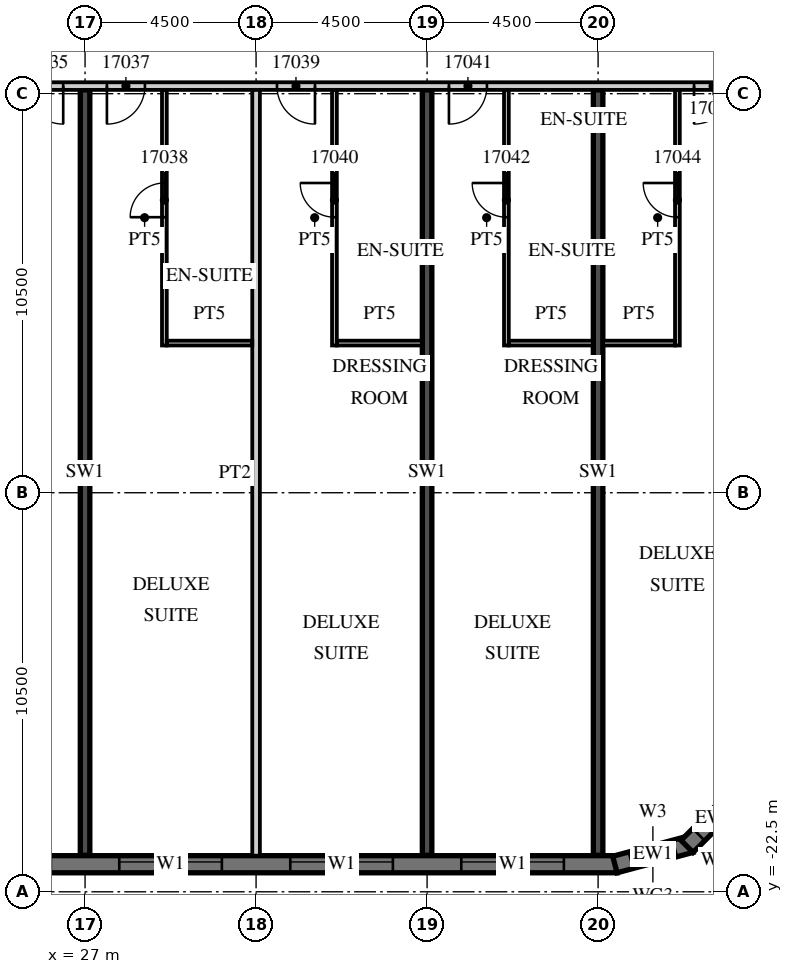
"""IFC4 building model, lengths in metres.
Left out: names, types, materials, properties, quantities, classifications, styles, units other than length and angle.
Written with IfcOpenShell. Run it as: python <this file> out.ifc"""

import sys

from ifc_helpers import new_model, si_unit, direction, frame, frame_2d, origin, place, context, subcontext, project, spatial, polyline, rectangle, outline, extrude, element, fill, save


model = new_model("IFC4")
c1 = context("Model", 3, precision=1e-05, world=origin(), true_north=direction((0.0, 1.0)))
c2 = subcontext(c1, "Body", "Model", "MODEL_VIEW")
j1 = project(units=[si_unit("LENGTHUNIT", "METRE"), si_unit("PLANEANGLEUNIT", "RADIAN")], contexts=[c1])
p1 = place(None, origin())
s1 = spatial("IfcSite", under=j1, at=p1, CompositionType="ELEMENT")
p2 = place(p1, origin())
s2 = spatial("IfcBuilding", under=s1, at=p2, CompositionType="ELEMENT")
p3 = place(p2, frame((0.0, 0.0, 86.4)))
s3 = spatial("IfcBuildingStorey", under=s2, at=p3, CompositionType="ELEMENT", Elevation=86.4)
for number, where, z_axis, x_axis in (
    (1, (27.0, -21.54, 0.0), (0.0, 0.0, 1.0), (0.0, 1.0, 0.0)),
    (2, (36.0, -21.54, 0.0), (0.0, 0.0, 1.0), (0.0, 1.0, 0.0)),
    (3, (40.5, -21.54, 0.0), (0.0, 0.0, 1.0), (0.0, 1.0, 0.0)),
):
    element("IfcWall", number, at=place(p3, frame(where, z_axis=z_axis, x_axis=x_axis)), inside=s3, PredefinedType="SHEAR", context=c2, shape_type="SweptSolid", body=[
        extrude(rectangle(XDim=20.14, YDim=0.25, at=frame_2d((10.07, 0.0))), origin(), (0.0, 0.0, 1.0), 3.3),
    ])
p4 = place(p3, frame((-13.5, -21.775, 0.0), z_axis=(0.0, 0.0, 1.0), x_axis=(1.0, 0.0, 0.0)))
e4 = element("IfcWall", 4, at=p4, inside=s3, PredefinedType="SOLIDWALL", context=c2, shape_type="SweptSolid", body=[
    extrude(rectangle(XDim=54.5, YDim=0.45, at=frame_2d((27.25, 0.0))), origin(), (0.0, 0.0, 1.0), 3.02),
])
p5 = place(p4, frame((0.9, 0.0, 0.45)))
e5 = element("IfcOpeningElement", 5, at=p5, cuts=e4, PredefinedType="OPENING", context=c2, shape_type="SweptSolid", body=[
    extrude(rectangle(XDim=2.7, YDim=2.25, at=frame_2d((1.35, 1.125))), frame((0.0, 0.235, 0.0), z_axis=(0.0, -1.0, 0.0), x_axis=(1.0, 0.0, 0.0)), (0.0, 0.0, 1.0), 0.47),
])
p6 = place(p4, frame((5.4, 0.0, 0.45)))
e6 = element("IfcOpeningElement", 6, at=p6, cuts=e4, PredefinedType="OPENING", context=c2, shape_type="SweptSolid", body=[
    extrude(rectangle(XDim=2.7, YDim=2.25, at=frame_2d((1.35, 1.125))), frame((0.0, 0.235, 0.0), z_axis=(0.0, -1.0, 0.0), x_axis=(1.0, 0.0, 0.0)), (0.0, 0.0, 1.0), 0.47),
])
p7 = place(p4, frame((9.9, 0.0, 0.45)))
e7 = element("IfcOpeningElement", 7, at=p7, cuts=e4, PredefinedType="OPENING", context=c2, shape_type="SweptSolid", body=[
    extrude(rectangle(XDim=2.7, YDim=2.25, at=frame_2d((1.35, 1.125))), frame((0.0, 0.235, 0.0), z_axis=(0.0, -1.0, 0.0), x_axis=(1.0, 0.0, 0.0)), (0.0, 0.0, 1.0), 0.47),
])
p8 = place(p4, frame((14.4, 0.0, 0.45)))
e8 = element("IfcOpeningElement", 8, at=p8, cuts=e4, PredefinedType="OPENING", context=c2, shape_type="SweptSolid", body=[
    extrude(rectangle(XDim=2.7, YDim=2.25, at=frame_2d((1.35, 1.125))), frame((0.0, 0.235, 0.0), z_axis=(0.0, -1.0, 0.0), x_axis=(1.0, 0.0, 0.0)), (0.0, 0.0, 1.0), 0.47),
])
p9 = place(p4, frame((18.9, 0.0, 0.45)))
e9 = element("IfcOpeningElement", 9, at=p9, cuts=e4, PredefinedType="OPENING", context=c2, shape_type="SweptSolid", body=[
    extrude(rectangle(XDim=2.7, YDim=2.25, at=frame_2d((1.35, 1.125))), frame((0.0, 0.235, 0.0), z_axis=(0.0, -1.0, 0.0), x_axis=(1.0, 0.0, 0.0)), (0.0, 0.0, 1.0), 0.47),
])
p10 = place(p4, frame((23.4, 0.0, 0.45)))
e10 = element("IfcOpeningElement", 10, at=p10, cuts=e4, PredefinedType="OPENING", context=c2, shape_type="SweptSolid", body=[
    extrude(rectangle(XDim=2.7, YDim=2.25, at=frame_2d((1.35, 1.125))), frame((0.0, 0.235, 0.0), z_axis=(0.0, -1.0, 0.0), x_axis=(1.0, 0.0, 0.0)), (0.0, 0.0, 1.0), 0.47),
])
p11 = place(p4, frame((27.9, 0.0, 0.45)))
e11 = element("IfcOpeningElement", 11, at=p11, cuts=e4, PredefinedType="OPENING", context=c2, shape_type="SweptSolid", body=[
    extrude(rectangle(XDim=2.7, YDim=2.25, at=frame_2d((1.35, 1.125))), frame((0.0, 0.235, 0.0), z_axis=(0.0, -1.0, 0.0), x_axis=(1.0, 0.0, 0.0)), (0.0, 0.0, 1.0), 0.47),
])
p12 = place(p4, frame((32.4, 0.0, 0.45)))
e12 = element("IfcOpeningElement", 12, at=p12, cuts=e4, PredefinedType="OPENING", context=c2, shape_type="SweptSolid", body=[
    extrude(rectangle(XDim=2.7, YDim=2.25, at=frame_2d((1.35, 1.125))), frame((0.0, 0.235, 0.0), z_axis=(0.0, -1.0, 0.0), x_axis=(1.0, 0.0, 0.0)), (0.0, 0.0, 1.0), 0.47),
])
p13 = place(p4, frame((36.9, 0.0, 0.45)))
e13 = element("IfcOpeningElement", 13, at=p13, cuts=e4, PredefinedType="OPENING", context=c2, shape_type="SweptSolid", body=[
    extrude(rectangle(XDim=2.7, YDim=2.25, at=frame_2d((1.35, 1.125))), frame((0.0, 0.235, 0.0), z_axis=(0.0, -1.0, 0.0), x_axis=(1.0, 0.0, 0.0)), (0.0, 0.0, 1.0), 0.47),
])
p14 = place(p4, frame((41.4, 0.0, 0.45)))
e14 = element("IfcOpeningElement", 14, at=p14, cuts=e4, PredefinedType="OPENING", context=c2, shape_type="SweptSolid", body=[
    extrude(rectangle(XDim=2.7, YDim=2.25, at=frame_2d((1.35, 1.125))), frame((0.0, 0.235, 0.0), z_axis=(0.0, -1.0, 0.0), x_axis=(1.0, 0.0, 0.0)), (0.0, 0.0, 1.0), 0.47),
])
p15 = place(p4, frame((45.9, 0.0, 0.45)))
e15 = element("IfcOpeningElement", 15, at=p15, cuts=e4, PredefinedType="OPENING", context=c2, shape_type="SweptSolid", body=[
    extrude(rectangle(XDim=2.7, YDim=2.25, at=frame_2d((1.35, 1.125))), frame((0.0, 0.235, 0.0), z_axis=(0.0, -1.0, 0.0), x_axis=(1.0, 0.0, 0.0)), (0.0, 0.0, 1.0), 0.47),
])
p16 = place(p4, frame((50.4, 0.0, 0.45)))
e16 = element("IfcOpeningElement", 16, at=p16, cuts=e4, PredefinedType="OPENING", context=c2, shape_type="SweptSolid", body=[
    extrude(rectangle(XDim=2.7, YDim=2.25, at=frame_2d((1.35, 1.125))), frame((0.0, 0.235, 0.0), z_axis=(0.0, -1.0, 0.0), x_axis=(1.0, 0.0, 0.0)), (0.0, 0.0, 1.0), 0.47),
])
p17 = place(p3, frame((40.942, -21.783, 0.0), z_axis=(0.0, 0.0, 1.0), x_axis=(0.965926999034, 0.25881466832, 0.0)))
e17 = element("IfcWall", 17, at=p17, inside=s3, PredefinedType="SOLIDWALL", context=c2, shape_type="SweptSolid", body=[
    extrude(outline(polyline([(0.0, -0.225), (2.071, -0.225), (1.95, 0.225), (0.121, 0.225), (0.0, -0.225)])), origin(), (0.0, 0.0, 1.0), 3.02),
])
p18 = place(p17, frame((0.435, 0.0, 0.45)))
e18 = element("IfcOpeningElement", 18, at=p18, cuts=e17, PredefinedType="OPENING", context=c2, shape_type="SweptSolid", body=[
    extrude(rectangle(XDim=1.2, YDim=2.25, at=frame_2d((0.6, 1.125))), frame((0.0, 0.235, 0.0), z_axis=(0.0, -1.0, 0.0), x_axis=(1.0, 0.0, 0.0)), (0.0, 0.0, 1.0), 0.47),
])
p19 = place(p3, frame((42.841, -21.305, 0.0), z_axis=(0.0, 0.0, 1.0), x_axis=(0.707106781187, 0.707106781187, 0.0)))
e19 = element("IfcWall", 19, at=p19, inside=s3, PredefinedType="SOLIDWALL", context=c2, shape_type="SweptSolid", body=[
    extrude(outline(polyline([(0.0, -0.225), (2.071, -0.225), (1.95, 0.225), (0.121, 0.225), (0.0, -0.225)])), origin(), (0.0, 0.0, 1.0), 3.02),
])
p20 = place(p19, frame((0.435, 0.0, 0.45)))
e20 = element("IfcOpeningElement", 20, at=p20, cuts=e19, PredefinedType="OPENING", context=c2, shape_type="SweptSolid", body=[
    extrude(rectangle(XDim=1.2, YDim=2.25, at=frame_2d((0.6, 1.125))), frame((0.0, 0.235, 0.0), z_axis=(0.0, -1.0, 0.0), x_axis=(1.0, 0.0, 0.0)), (0.0, 0.0, 1.0), 0.47),
])
p21 = place(p3, frame((-13.5, -1.3, 0.0), z_axis=(0.0, 0.0, 1.0), x_axis=(1.0, 0.0, 0.0)))
e21 = element("IfcWall", 21, at=p21, inside=s3, PredefinedType="PARTITIONING", context=c2, shape_type="SweptSolid", body=[
    extrude(rectangle(XDim=58.05, YDim=0.2, at=frame_2d((29.025, 0.0))), origin(), (0.0, 0.0, 1.0), 3.02),
])
p22 = place(p21, frame((2.925, 0.0, 0.0)))
e22 = element("IfcOpeningElement", 22, at=p22, cuts=e21, PredefinedType="OPENING", context=c2, shape_type="SweptSolid", body=[
    extrude(rectangle(XDim=1.0, YDim=2.1, at=frame_2d((0.5, 1.05))), frame((0.0, 0.11, 0.0), z_axis=(0.0, -1.0, 0.0), x_axis=(1.0, 0.0, 0.0)), (0.0, 0.0, 1.0), 0.22),
])
p23 = place(p21, frame((5.075, 0.0, 0.0)))
e23 = element("IfcOpeningElement", 23, at=p23, cuts=e21, PredefinedType="OPENING", context=c2, shape_type="SweptSolid", body=[
    extrude(rectangle(XDim=1.0, YDim=2.1, at=frame_2d((0.5, 1.05))), frame((0.0, 0.11, 0.0), z_axis=(0.0, -1.0, 0.0), x_axis=(1.0, 0.0, 0.0)), (0.0, 0.0, 1.0), 0.22),
])
p24 = place(p21, frame((9.55, 0.0, 0.0)))
e24 = element("IfcOpeningElement", 24, at=p24, cuts=e21, PredefinedType="OPENING", context=c2, shape_type="SweptSolid", body=[
    extrude(rectangle(XDim=1.0, YDim=2.1, at=frame_2d((0.5, 1.05))), frame((0.0, 0.11, 0.0), z_axis=(0.0, -1.0, 0.0), x_axis=(1.0, 0.0, 0.0)), (0.0, 0.0, 1.0), 0.22),
])
p25 = place(p21, frame((14.075, 0.0, 0.0)))
e25 = element("IfcOpeningElement", 25, at=p25, cuts=e21, PredefinedType="OPENING", context=c2, shape_type="SweptSolid", body=[
    extrude(rectangle(XDim=1.0, YDim=2.1, at=frame_2d((0.5, 1.05))), frame((0.0, 0.11, 0.0), z_axis=(0.0, -1.0, 0.0), x_axis=(1.0, 0.0, 0.0)), (0.0, 0.0, 1.0), 0.22),
])
p26 = place(p21, frame((20.925, 0.0, 0.0)))
e26 = element("IfcOpeningElement", 26, at=p26, cuts=e21, PredefinedType="OPENING", context=c2, shape_type="SweptSolid", body=[
    extrude(rectangle(XDim=1.0, YDim=2.1, at=frame_2d((0.5, 1.05))), frame((0.0, 0.11, 0.0), z_axis=(0.0, -1.0, 0.0), x_axis=(1.0, 0.0, 0.0)), (0.0, 0.0, 1.0), 0.22),
])
p27 = place(p21, frame((27.862, 0.0, 0.0)))
e27 = element("IfcOpeningElement", 27, at=p27, cuts=e21, PredefinedType="OPENING", context=c2, shape_type="SweptSolid", body=[
    extrude(rectangle(XDim=1.2, YDim=2.1, at=frame_2d((0.6, 1.05))), frame((0.0, 0.11, 0.0), z_axis=(0.0, -1.0, 0.0), x_axis=(1.0, 0.0, 0.0)), (0.0, 0.0, 1.0), 0.22),
])
p28 = place(p21, frame((34.45, 0.0, 0.0)))
e28 = element("IfcOpeningElement", 28, at=p28, cuts=e21, PredefinedType="OPENING", context=c2, shape_type="SweptSolid", body=[
    extrude(rectangle(XDim=1.0, YDim=2.1, at=frame_2d((0.5, 1.05))), frame((0.0, 0.11, 0.0), z_axis=(0.0, -1.0, 0.0), x_axis=(1.0, 0.0, 0.0)), (0.0, 0.0, 1.0), 0.22),
])
p29 = place(p21, frame((38.925, 0.0, 0.0)))
e29 = element("IfcOpeningElement", 29, at=p29, cuts=e21, PredefinedType="OPENING", context=c2, shape_type="SweptSolid", body=[
    extrude(rectangle(XDim=1.0, YDim=2.1, at=frame_2d((0.5, 1.05))), frame((0.0, 0.11, 0.0), z_axis=(0.0, -1.0, 0.0), x_axis=(1.0, 0.0, 0.0)), (0.0, 0.0, 1.0), 0.22),
])
p30 = place(p21, frame((41.075, 0.0, 0.0)))
e30 = element("IfcOpeningElement", 30, at=p30, cuts=e21, PredefinedType="OPENING", context=c2, shape_type="SweptSolid", body=[
    extrude(rectangle(XDim=1.0, YDim=2.1, at=frame_2d((0.5, 1.05))), frame((0.0, 0.11, 0.0), z_axis=(0.0, -1.0, 0.0), x_axis=(1.0, 0.0, 0.0)), (0.0, 0.0, 1.0), 0.22),
])
p31 = place(p21, frame((45.55, 0.0, 0.0)))
e31 = element("IfcOpeningElement", 31, at=p31, cuts=e21, PredefinedType="OPENING", context=c2, shape_type="SweptSolid", body=[
    extrude(rectangle(XDim=1.0, YDim=2.1, at=frame_2d((0.5, 1.05))), frame((0.0, 0.11, 0.0), z_axis=(0.0, -1.0, 0.0), x_axis=(1.0, 0.0, 0.0)), (0.0, 0.0, 1.0), 0.22),
])
p32 = place(p21, frame((50.075, 0.0, 0.0)))
e32 = element("IfcOpeningElement", 32, at=p32, cuts=e21, PredefinedType="OPENING", context=c2, shape_type="SweptSolid", body=[
    extrude(rectangle(XDim=1.0, YDim=2.1, at=frame_2d((0.5, 1.05))), frame((0.0, 0.11, 0.0), z_axis=(0.0, -1.0, 0.0), x_axis=(1.0, 0.0, 0.0)), (0.0, 0.0, 1.0), 0.22),
])
p33 = place(p21, frame((56.525, 0.0, 0.0)))
e33 = element("IfcOpeningElement", 33, at=p33, cuts=e21, PredefinedType="OPENING", context=c2, shape_type="SweptSolid", body=[
    extrude(rectangle(XDim=1.0, YDim=2.1, at=frame_2d((0.5, 1.05))), frame((0.0, 0.11, 0.0), z_axis=(0.0, -1.0, 0.0), x_axis=(1.0, 0.0, 0.0)), (0.0, 0.0, 1.0), 0.22),
])
p34 = place(p3, frame((31.5, -21.55, 0.0), z_axis=(0.0, 0.0, 1.0), x_axis=(0.0, 1.0, 0.0)))
e34 = element("IfcWall", 34, at=p34, inside=s3, PredefinedType="PARTITIONING", context=c2, shape_type="SweptSolid", body=[
    extrude(rectangle(XDim=20.15, YDim=0.2, at=frame_2d((10.075, 0.0))), origin(), (0.0, 0.0, 1.0), 3.02),
])
p35 = place(p3, frame((29.087, -8.125, 0.0), z_axis=(0.0, 0.0, 1.0), x_axis=(0.0, 1.0, 0.0)))
e35 = element("IfcWall", 35, at=p35, inside=s3, PredefinedType="PARTITIONING", context=c2, shape_type="SweptSolid", body=[
    extrude(rectangle(XDim=6.725, YDim=0.125, at=frame_2d((3.363, 0.0))), origin(), (0.0, 0.0, 1.0), 3.02),
])
p36 = place(p35, frame((3.375, 0.0, 0.0)))
e36 = element("IfcOpeningElement", 36, at=p36, cuts=e35, PredefinedType="OPENING", context=c2, shape_type="SweptSolid", body=[
    extrude(rectangle(XDim=0.9, YDim=2.1, at=frame_2d((0.45, 1.05))), frame((0.0, 0.073, 0.0), z_axis=(0.0, -1.0, 0.0), x_axis=(1.0, 0.0, 0.0)), (0.0, 0.0, 1.0), 0.145),
])
p37 = place(p3, frame((29.15, -8.062, 0.0), z_axis=(0.0, 0.0, 1.0), x_axis=(1.0, 0.0, 0.0)))
e37 = element("IfcWall", 37, at=p37, inside=s3, PredefinedType="PARTITIONING", context=c2, shape_type="SweptSolid", body=[
    extrude(rectangle(XDim=2.25, YDim=0.125, at=frame_2d((1.125, 0.0))), origin(), (0.0, 0.0, 1.0), 3.02),
])
p38 = place(p3, frame((33.562, -8.125, 0.0), z_axis=(0.0, 0.0, 1.0), x_axis=(0.0, 1.0, 0.0)))
e38 = element("IfcWall", 38, at=p38, inside=s3, PredefinedType="PARTITIONING", context=c2, shape_type="SweptSolid", body=[
    extrude(rectangle(XDim=6.725, YDim=0.125, at=frame_2d((3.363, 0.0))), origin(), (0.0, 0.0, 1.0), 3.02),
])
p39 = place(p38, frame((3.375, 0.0, 0.0)))
e39 = element("IfcOpeningElement", 39, at=p39, cuts=e38, PredefinedType="OPENING", context=c2, shape_type="SweptSolid", body=[
    extrude(rectangle(XDim=0.9, YDim=2.1, at=frame_2d((0.45, 1.05))), frame((0.0, 0.073, 0.0), z_axis=(0.0, -1.0, 0.0), x_axis=(1.0, 0.0, 0.0)), (0.0, 0.0, 1.0), 0.145),
])
p40 = place(p3, frame((33.625, -8.062, 0.0), z_axis=(0.0, 0.0, 1.0), x_axis=(1.0, 0.0, 0.0)))
e40 = element("IfcWall", 40, at=p40, inside=s3, PredefinedType="PARTITIONING", context=c2, shape_type="SweptSolid", body=[
    extrude(rectangle(XDim=2.25, YDim=0.125, at=frame_2d((1.125, 0.0))), origin(), (0.0, 0.0, 1.0), 3.02),
])
p41 = place(p3, frame((38.087, -8.125, 0.0), z_axis=(0.0, 0.0, 1.0), x_axis=(0.0, 1.0, 0.0)))
e41 = element("IfcWall", 41, at=p41, inside=s3, PredefinedType="PARTITIONING", context=c2, shape_type="SweptSolid", body=[
    extrude(rectangle(XDim=6.725, YDim=0.125, at=frame_2d((3.363, 0.0))), origin(), (0.0, 0.0, 1.0), 3.02),
])
p42 = place(p41, frame((3.375, 0.0, 0.0)))
e42 = element("IfcOpeningElement", 42, at=p42, cuts=e41, PredefinedType="OPENING", context=c2, shape_type="SweptSolid", body=[
    extrude(rectangle(XDim=0.9, YDim=2.1, at=frame_2d((0.45, 1.05))), frame((0.0, 0.073, 0.0), z_axis=(0.0, -1.0, 0.0), x_axis=(1.0, 0.0, 0.0)), (0.0, 0.0, 1.0), 0.145),
])
p43 = place(p3, frame((38.15, -8.062, 0.0), z_axis=(0.0, 0.0, 1.0), x_axis=(1.0, 0.0, 0.0)))
e43 = element("IfcWall", 43, at=p43, inside=s3, PredefinedType="PARTITIONING", context=c2, shape_type="SweptSolid", body=[
    extrude(rectangle(XDim=2.225, YDim=0.125, at=frame_2d((1.113, 0.0))), origin(), (0.0, 0.0, 1.0), 3.02),
])
p44 = place(p3, frame((42.587, -8.125, 0.0), z_axis=(0.0, 0.0, 1.0), x_axis=(0.0, 1.0, 0.0)))
e44 = element("IfcWall", 44, at=p44, inside=s3, PredefinedType="PARTITIONING", context=c2, shape_type="SweptSolid", body=[
    extrude(rectangle(XDim=6.725, YDim=0.125, at=frame_2d((3.363, 0.0))), origin(), (0.0, 0.0, 1.0), 3.02),
])
p45 = place(p44, frame((3.375, 0.0, 0.0)))
e45 = element("IfcOpeningElement", 45, at=p45, cuts=e44, PredefinedType="OPENING", context=c2, shape_type="SweptSolid", body=[
    extrude(rectangle(XDim=0.9, YDim=2.1, at=frame_2d((0.45, 1.05))), frame((0.0, 0.073, 0.0), z_axis=(0.0, -1.0, 0.0), x_axis=(1.0, 0.0, 0.0)), (0.0, 0.0, 1.0), 0.145),
])
p46 = place(p3, frame((40.625, -8.062, 0.0), z_axis=(0.0, 0.0, 1.0), x_axis=(1.0, 0.0, 0.0)))
e46 = element("IfcWall", 46, at=p46, inside=s3, PredefinedType="PARTITIONING", context=c2, shape_type="SweptSolid", body=[
    extrude(rectangle(XDim=1.9, YDim=0.125, at=frame_2d((0.95, 0.0))), origin(), (0.0, 0.0, 1.0), 3.02),
])
p47 = place(p14, origin())
e47 = element("IfcWindow", 47, at=p47, inside=s3, PartitioningType="SINGLE_PANEL", PredefinedType="WINDOW", context=c2, shape_type="SweptSolid", body=[
    extrude(rectangle(XDim=2.7, YDim=2.25, at=frame_2d((1.35, 1.125))), frame((0.0, 0.09, 0.0), z_axis=(0.0, -1.0, 0.0), x_axis=(1.0, 0.0, 0.0)), (0.0, 0.0, 1.0), 0.06),
])
fill(e14, e47)
p48 = place(p15, origin())
e48 = element("IfcWindow", 48, at=p48, inside=s3, PartitioningType="SINGLE_PANEL", PredefinedType="WINDOW", context=c2, shape_type="SweptSolid", body=[
    extrude(rectangle(XDim=2.7, YDim=2.25, at=frame_2d((1.35, 1.125))), frame((0.0, 0.09, 0.0), z_axis=(0.0, -1.0, 0.0), x_axis=(1.0, 0.0, 0.0)), (0.0, 0.0, 1.0), 0.06),
])
fill(e15, e48)
p49 = place(p16, origin())
e49 = element("IfcWindow", 49, at=p49, inside=s3, PartitioningType="SINGLE_PANEL", PredefinedType="WINDOW", context=c2, shape_type="SweptSolid", body=[
    extrude(rectangle(XDim=2.7, YDim=2.25, at=frame_2d((1.35, 1.125))), frame((0.0, 0.09, 0.0), z_axis=(0.0, -1.0, 0.0), x_axis=(1.0, 0.0, 0.0)), (0.0, 0.0, 1.0), 0.06),
])
fill(e16, e49)
p50 = place(p18, origin())
e50 = element("IfcWindow", 50, at=p50, inside=s3, PartitioningType="SINGLE_PANEL", PredefinedType="WINDOW", context=c2, shape_type="SweptSolid", body=[
    extrude(rectangle(XDim=1.2, YDim=2.25, at=frame_2d((0.6, 1.125))), frame((0.0, 0.09, 0.0), z_axis=(0.0, -1.0, 0.0), x_axis=(1.0, 0.0, 0.0)), (0.0, 0.0, 1.0), 0.06),
])
fill(e18, e50)
p51 = place(p20, origin())
e51 = element("IfcWindow", 51, at=p51, inside=s3, PartitioningType="SINGLE_PANEL", PredefinedType="WINDOW", context=c2, shape_type="SweptSolid", body=[
    extrude(rectangle(XDim=1.2, YDim=2.25, at=frame_2d((0.6, 1.125))), frame((0.0, 0.09, 0.0), z_axis=(0.0, -1.0, 0.0), x_axis=(1.0, 0.0, 0.0)), (0.0, 0.0, 1.0), 0.06),
])
fill(e20, e51)
p52 = place(p29, origin())
e52 = element("IfcDoor", 52, at=p52, inside=s3, OperationType="SINGLE_SWING_RIGHT", PredefinedType="DOOR", context=c2, shape_type="SweptSolid", body=[
    extrude(rectangle(XDim=1.0, YDim=2.1, at=frame_2d((0.5, 1.05))), frame((0.0, 0.025, 0.0), z_axis=(0.0, -1.0, 0.0), x_axis=(1.0, 0.0, 0.0)), (0.0, 0.0, 1.0), 0.05),
])
fill(e29, e52)
p53 = place(p30, origin())
e53 = element("IfcDoor", 53, at=p53, inside=s3, OperationType="SINGLE_SWING_LEFT", PredefinedType="DOOR", context=c2, shape_type="SweptSolid", body=[
    extrude(rectangle(XDim=1.0, YDim=2.1, at=frame_2d((0.5, 1.05))), frame((0.0, 0.025, 0.0), z_axis=(0.0, -1.0, 0.0), x_axis=(1.0, 0.0, 0.0)), (0.0, 0.0, 1.0), 0.05),
])
fill(e30, e53)
p54 = place(p36, origin())
e54 = element("IfcDoor", 54, at=p54, inside=s3, OperationType="SINGLE_SWING_LEFT", PredefinedType="DOOR", context=c2, shape_type="SweptSolid", body=[
    extrude(rectangle(XDim=0.9, YDim=2.1, at=frame_2d((0.45, 1.05))), frame((0.0, 0.025, 0.0), z_axis=(0.0, -1.0, 0.0), x_axis=(1.0, 0.0, 0.0)), (0.0, 0.0, 1.0), 0.05),
])
fill(e36, e54)
p55 = place(p31, origin())
e55 = element("IfcDoor", 55, at=p55, inside=s3, OperationType="SINGLE_SWING_RIGHT", PredefinedType="DOOR", context=c2, shape_type="SweptSolid", body=[
    extrude(rectangle(XDim=1.0, YDim=2.1, at=frame_2d((0.5, 1.05))), frame((0.0, 0.025, 0.0), z_axis=(0.0, -1.0, 0.0), x_axis=(1.0, 0.0, 0.0)), (0.0, 0.0, 1.0), 0.05),
])
fill(e31, e55)
p56 = place(p39, origin())
e56 = element("IfcDoor", 56, at=p56, inside=s3, OperationType="SINGLE_SWING_RIGHT", PredefinedType="DOOR", context=c2, shape_type="SweptSolid", body=[
    extrude(rectangle(XDim=0.9, YDim=2.1, at=frame_2d((0.45, 1.05))), frame((0.0, 0.025, 0.0), z_axis=(0.0, -1.0, 0.0), x_axis=(1.0, 0.0, 0.0)), (0.0, 0.0, 1.0), 0.05),
])
fill(e39, e56)
p57 = place(p32, origin())
e57 = element("IfcDoor", 57, at=p57, inside=s3, OperationType="SINGLE_SWING_LEFT", PredefinedType="DOOR", context=c2, shape_type="SweptSolid", body=[
    extrude(rectangle(XDim=1.0, YDim=2.1, at=frame_2d((0.5, 1.05))), frame((0.0, 0.025, 0.0), z_axis=(0.0, -1.0, 0.0), x_axis=(1.0, 0.0, 0.0)), (0.0, 0.0, 1.0), 0.05),
])
fill(e32, e57)
p58 = place(p42, origin())
e58 = element("IfcDoor", 58, at=p58, inside=s3, OperationType="SINGLE_SWING_RIGHT", PredefinedType="DOOR", context=c2, shape_type="SweptSolid", body=[
    extrude(rectangle(XDim=0.9, YDim=2.1, at=frame_2d((0.45, 1.05))), frame((0.0, 0.025, 0.0), z_axis=(0.0, -1.0, 0.0), x_axis=(1.0, 0.0, 0.0)), (0.0, 0.0, 1.0), 0.05),
])
fill(e42, e58)
p59 = place(p33, origin())
e59 = element("IfcDoor", 59, at=p59, inside=s3, OperationType="SINGLE_SWING_LEFT", PredefinedType="DOOR", context=c2, shape_type="SweptSolid", body=[
    extrude(rectangle(XDim=1.0, YDim=2.1, at=frame_2d((0.5, 1.05))), frame((0.0, 0.025, 0.0), z_axis=(0.0, -1.0, 0.0), x_axis=(1.0, 0.0, 0.0)), (0.0, 0.0, 1.0), 0.05),
])
fill(e33, e59)
p60 = place(p45, origin())
e60 = element("IfcDoor", 60, at=p60, inside=s3, OperationType="SINGLE_SWING_RIGHT", PredefinedType="DOOR", context=c2, shape_type="SweptSolid", body=[
    extrude(rectangle(XDim=0.9, YDim=2.1, at=frame_2d((0.45, 1.05))), frame((0.0, 0.025, 0.0), z_axis=(0.0, -1.0, 0.0), x_axis=(1.0, 0.0, 0.0)), (0.0, 0.0, 1.0), 0.05),
])
fill(e45, e60)
save(model, sys.argv[1])
